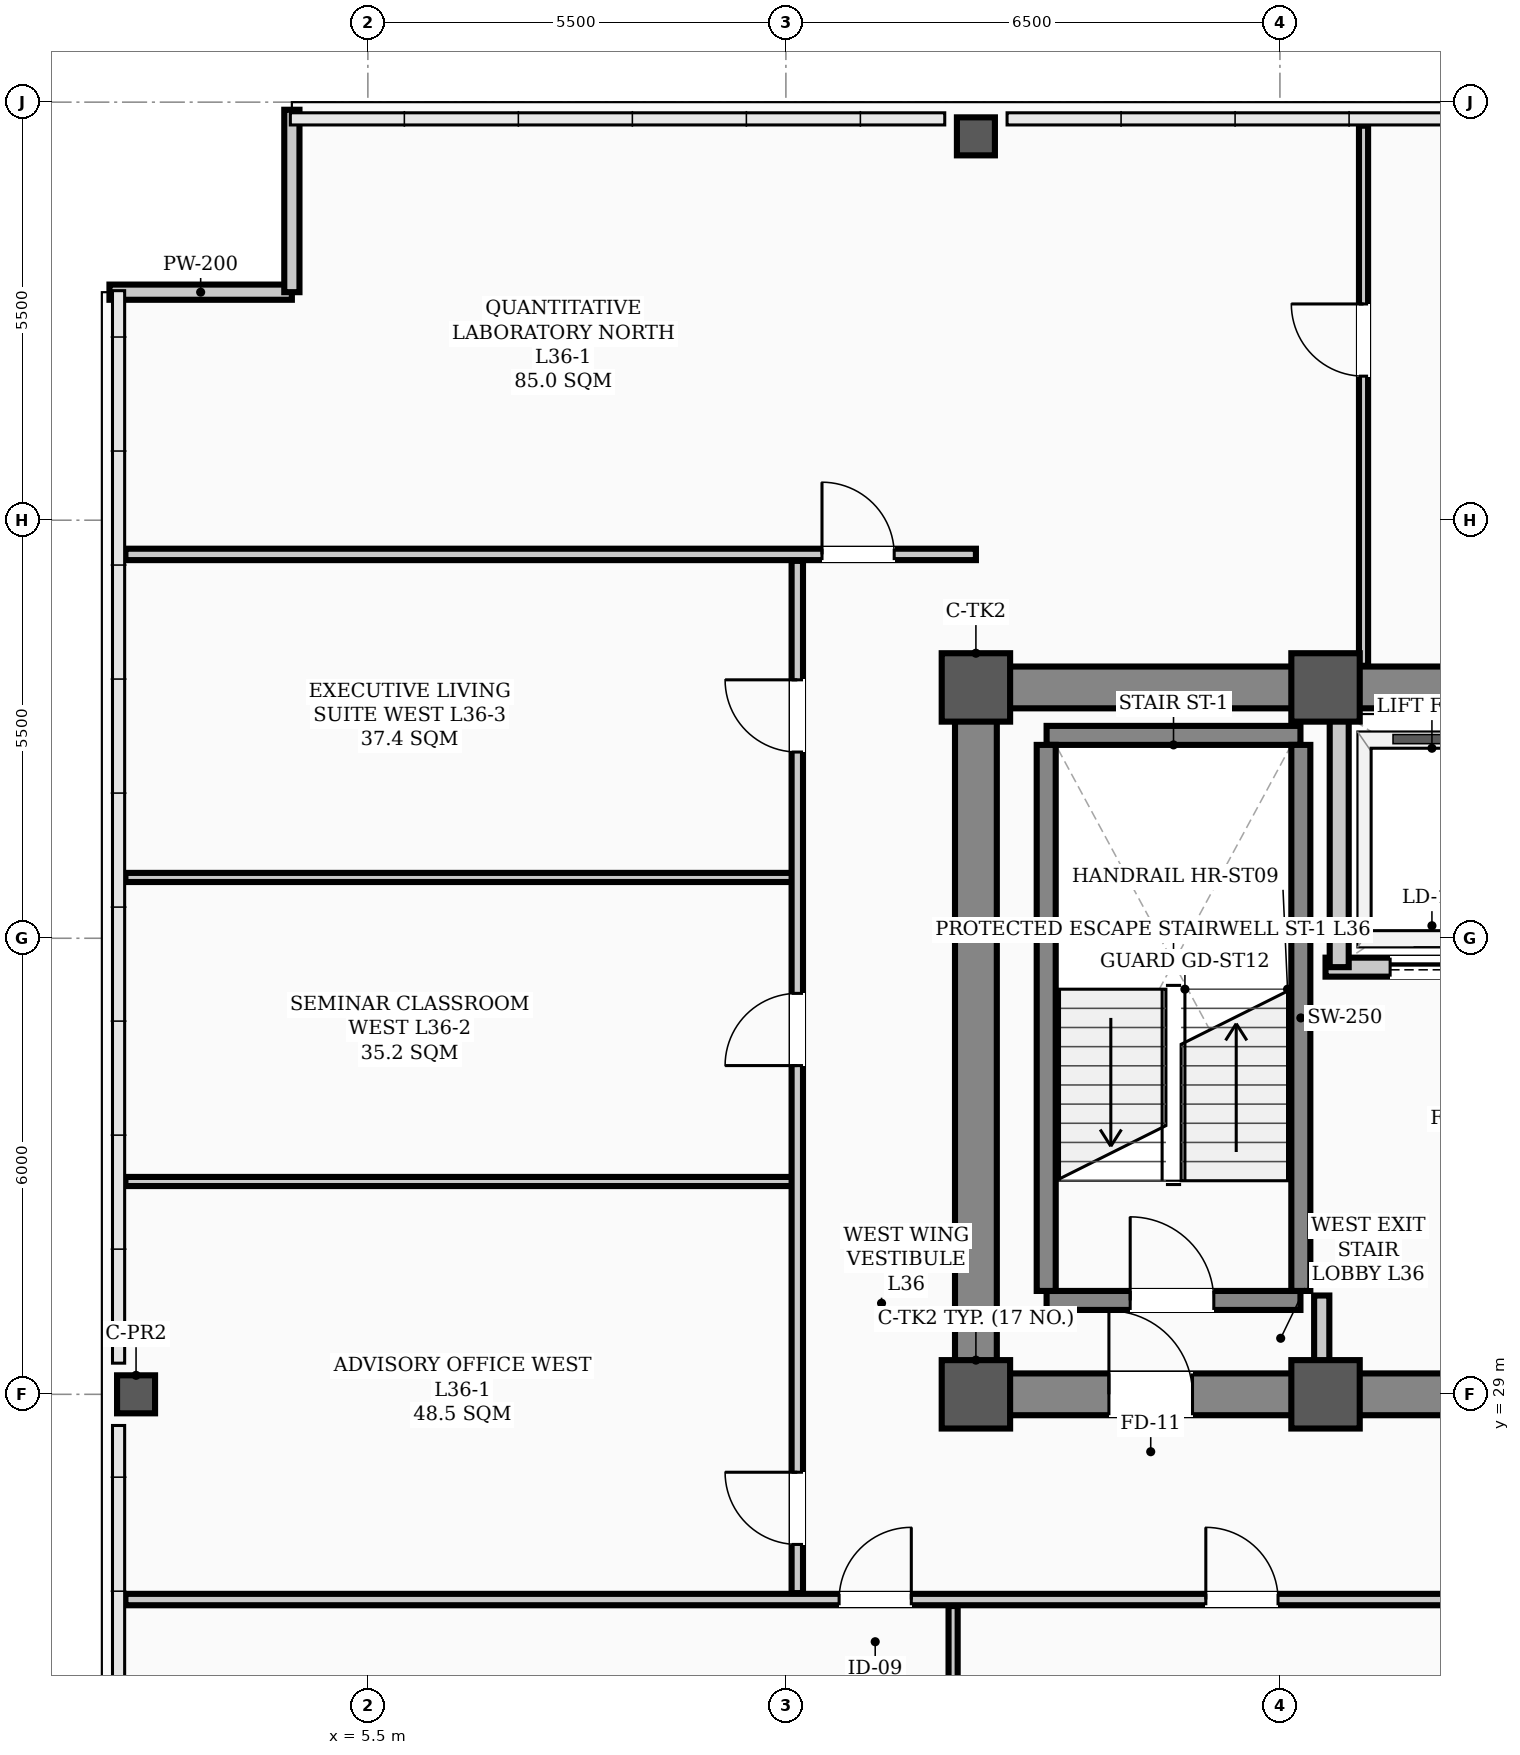
"""IFC4 building model, lengths in metres.
Left out: names, types, materials, properties, quantities, classifications, styles, units other than length and angle.
Written with IfcOpenShell. Run it as: python <this file> out.ifc"""

import sys

from ifc_helpers import new_model, si_unit, direction, frame, frame_2d, origin, origin_2d, place, context, subcontext, project, spatial, rectangle, hollow_rectangle, extrude, element, fill, save


model = new_model("IFC4")
c1 = context("Model", 3, precision=1e-05, world=origin(), true_north=direction((0.0, 1.0)))
c2 = subcontext(c1, "Body", "Model", "MODEL_VIEW")
j1 = project(units=[si_unit("LENGTHUNIT", "METRE"), si_unit("PLANEANGLEUNIT", "RADIAN")], contexts=[c1])
p1 = place(None, origin())
s1 = spatial("IfcSite", under=j1, at=p1, CompositionType="ELEMENT")
p2 = place(p1, origin())
s2 = spatial("IfcBuilding", under=s1, at=p2, CompositionType="ELEMENT")
p3 = place(p2, frame((0.0, 0.0, 146.1)))
s3 = spatial("IfcBuildingStorey", under=s2, at=p3, CompositionType="ELEMENT", Elevation=146.1)
for number, where, z_axis, x_axis in (
    (1, (13.5, 29.0, 0.0), (0.0, 0.0, 1.0), (1.0, 0.0, 0.0)),
    (2, (13.5, 38.3, 0.0), (0.0, 0.0, 1.0), (1.0, 0.0, 0.0)),
    (3, (18.1, 29.0, 0.0), (0.0, 0.0, 1.0), (1.0, 0.0, 0.0)),
    (4, (18.1, 38.3, 0.0), (0.0, 0.0, 1.0), (1.0, 0.0, 0.0)),
):
    element("IfcColumn", number, at=place(p3, frame(where, z_axis=z_axis, x_axis=x_axis)), inside=s3, PredefinedType="COLUMN", context=c2, shape_type="SweptSolid", body=[
        extrude(hollow_rectangle(XDim=0.9, YDim=0.9, WallThickness=0.035, InnerFilletRadius=0.017, OuterFilletRadius=0.052, at=origin_2d()), origin(), (0.0, 0.0, 1.0), 3.9),
    ])
for number, where, z_axis, x_axis in (
    (5, (2.45, 29.0, 0.0), (0.0, 0.0, 1.0), (1.0, 0.0, 0.0)),
    (6, (13.5, 45.55, 0.0), (0.0, 0.0, 1.0), (1.0, 0.0, 0.0)),
):
    element("IfcColumn", number, at=place(p3, frame(where, z_axis=z_axis, x_axis=x_axis)), inside=s3, PredefinedType="COLUMN", context=c2, shape_type="SweptSolid", body=[
        extrude(hollow_rectangle(XDim=0.5, YDim=0.5, WallThickness=0.024, InnerFilletRadius=0.012, OuterFilletRadius=0.036, at=origin_2d()), origin(), (0.0, 0.0, 1.0), 3.9),
    ])
for number, where, z_axis, x_axis in (
    (7, (2.1, 43.5, 0.0), (0.0, 0.0, 1.0), (1.0, 0.0, 0.0)),
    (8, (4.5, 43.5, 0.0), (0.0, 0.0, 1.0), (0.0, 1.0, 0.0)),
):
    element("IfcWall", number, at=place(p3, frame(where, z_axis=z_axis, x_axis=x_axis)), inside=s3, PredefinedType="PARAPET", context=c2, shape_type="SweptSolid", body=[
        extrude(rectangle(XDim=2.4, YDim=0.2, at=frame_2d((1.2, 0.0))), origin(), (0.0, 0.0, 1.0), 1.2),
    ])
p4 = place(p3, frame((13.5, 29.0, 0.0), z_axis=(0.0, 0.0, 1.0), x_axis=(1.0, 0.0, 0.0)))
e9 = element("IfcWall", 9, at=p4, inside=s3, PredefinedType="SHEAR", context=c2, shape_type="SweptSolid", body=[
    extrude(rectangle(XDim=30.5, YDim=0.55, at=frame_2d((15.25, 0.0))), origin(), (0.0, 0.0, 1.0), 3.72),
])
p5 = place(p4, frame((1.75, 0.0, 0.0)))
e10 = element("IfcOpeningElement", 10, at=p5, cuts=e9, PredefinedType="OPENING", context=c2, shape_type="SweptSolid", body=[
    extrude(rectangle(XDim=1.1, YDim=2.08, at=frame_2d((0.55, 1.04))), frame((0.0, 0.285, 0.0), z_axis=(0.0, -1.0, 0.0), x_axis=(1.0, 0.0, 0.0)), (0.0, 0.0, 1.0), 0.57),
])
p6 = place(p4, frame((26.7, 0.0, 0.0)))
e11 = element("IfcOpeningElement", 11, at=p6, cuts=e9, PredefinedType="OPENING", context=c2, shape_type="SweptSolid", body=[
    extrude(rectangle(XDim=1.1, YDim=2.08, at=frame_2d((0.55, 1.04))), frame((0.0, 0.285, 0.0), z_axis=(0.0, -1.0, 0.0), x_axis=(1.0, 0.0, 0.0)), (0.0, 0.0, 1.0), 0.57),
])
p7 = place(p4, frame((6.8, 0.0, 0.0)))
e12 = element("IfcOpeningElement", 12, at=p7, cuts=e9, PredefinedType="OPENING", context=c2, shape_type="SweptSolid", body=[
    extrude(rectangle(XDim=1.1, YDim=2.08, at=frame_2d((0.55, 1.04))), frame((0.0, 0.285, 0.0), z_axis=(0.0, -1.0, 0.0), x_axis=(1.0, 0.0, 0.0)), (0.0, 0.0, 1.0), 0.57),
])
p8 = place(p4, frame((13.2, 0.0, 0.0)))
e13 = element("IfcOpeningElement", 13, at=p8, cuts=e9, PredefinedType="OPENING", context=c2, shape_type="SweptSolid", body=[
    extrude(rectangle(XDim=1.6, YDim=2.08, at=frame_2d((0.8, 1.04))), frame((0.0, 0.285, 0.0), z_axis=(0.0, -1.0, 0.0), x_axis=(1.0, 0.0, 0.0)), (0.0, 0.0, 1.0), 0.57),
])
p9 = place(p4, frame((19.53, 0.0, 0.0)))
e14 = element("IfcOpeningElement", 14, at=p9, cuts=e9, PredefinedType="OPENING", context=c2, shape_type="SweptSolid", body=[
    extrude(rectangle(XDim=0.9, YDim=2.08, at=frame_2d((0.45, 1.04))), frame((0.0, 0.285, 0.0), z_axis=(0.0, -1.0, 0.0), x_axis=(1.0, 0.0, 0.0)), (0.0, 0.0, 1.0), 0.57),
])
p10 = place(p4, frame((21.57, 0.0, 0.0)))
e15 = element("IfcOpeningElement", 15, at=p10, cuts=e9, PredefinedType="OPENING", context=c2, shape_type="SweptSolid", body=[
    extrude(rectangle(XDim=0.9, YDim=2.08, at=frame_2d((0.45, 1.04))), frame((0.0, 0.285, 0.0), z_axis=(0.0, -1.0, 0.0), x_axis=(1.0, 0.0, 0.0)), (0.0, 0.0, 1.0), 0.57),
])
p11 = place(p3, frame((13.5, 38.3, 0.0), z_axis=(0.0, 0.0, 1.0), x_axis=(1.0, 0.0, 0.0)))
e16 = element("IfcWall", 16, at=p11, inside=s3, PredefinedType="SHEAR", context=c2, shape_type="SweptSolid", body=[
    extrude(rectangle(XDim=30.5, YDim=0.55, at=frame_2d((15.25, 0.0))), origin(), (0.0, 0.0, 1.0), 3.72),
])
p12 = place(p3, frame((13.5, 29.35, 0.0), z_axis=(0.0, 0.0, 1.0), x_axis=(0.0, 1.0, 0.0)))
e17 = element("IfcWall", 17, at=p12, inside=s3, PredefinedType="SHEAR", context=c2, shape_type="SweptSolid", body=[
    extrude(rectangle(XDim=8.6, YDim=0.55, at=frame_2d((4.3, 0.0))), origin(), (0.0, 0.0, 1.0), 3.72),
])
p13 = place(p3, frame((14.43, 30.235, 0.0), z_axis=(0.0, 0.0, 1.0), x_axis=(1.0, 0.0, 0.0)))
e18 = element("IfcWall", 18, at=p13, inside=s3, PredefinedType="STANDARD", context=c2, shape_type="SweptSolid", body=[
    extrude(rectangle(XDim=3.34, YDim=0.25, at=frame_2d((1.67, 0.0))), origin(), (0.0, 0.0, 1.0), 3.72),
])
p14 = place(p13, frame((1.1, 0.0, 0.0)))
e19 = element("IfcOpeningElement", 19, at=p14, cuts=e18, PredefinedType="OPENING", context=c2, shape_type="SweptSolid", body=[
    extrude(rectangle(XDim=1.1, YDim=2.08, at=frame_2d((0.55, 1.04))), frame((0.0, 0.135, 0.0), z_axis=(0.0, -1.0, 0.0), x_axis=(1.0, 0.0, 0.0)), (0.0, 0.0, 1.0), 0.27),
])
p15 = place(p3, frame((14.43, 37.669, 0.0), z_axis=(0.0, 0.0, 1.0), x_axis=(1.0, 0.0, 0.0)))
e20 = element("IfcWall", 20, at=p15, inside=s3, PredefinedType="STANDARD", context=c2, shape_type="SweptSolid", body=[
    extrude(rectangle(XDim=3.34, YDim=0.25, at=frame_2d((1.67, 0.0))), origin(), (0.0, 0.0, 1.0), 3.72),
])
for number, where, z_axis, x_axis in (
    (21, (14.425, 30.36, 0.0), (0.0, 0.0, 1.0), (0.0, 1.0, 0.0)),
    (22, (17.775, 30.36, 0.0), (0.0, 0.0, 1.0), (0.0, 1.0, 0.0)),
):
    element("IfcWall", number, at=place(p3, frame(where, z_axis=z_axis, x_axis=x_axis)), inside=s3, PredefinedType="STANDARD", context=c2, shape_type="SweptSolid", body=[
        extrude(rectangle(XDim=7.184, YDim=0.25, at=frame_2d((3.592, 0.0))), origin(), (0.0, 0.0, 1.0), 3.72),
    ])
p16 = place(p3, frame((18.1, 34.62, 0.0), z_axis=(0.0, 0.0, 1.0), x_axis=(1.0, 0.0, 0.0)))
e23 = element("IfcWall", 23, at=p16, inside=s3, PredefinedType="STANDARD", context=c2, shape_type="SweptSolid", body=[
    extrude(rectangle(XDim=5.35, YDim=0.25, at=frame_2d((2.675, 0.0))), origin(), (0.0, 0.0, 1.0), 3.72),
])
p17 = place(p16, frame((0.85, 0.0, 0.0)))
e24 = element("IfcOpeningElement", 24, at=p17, cuts=e23, PredefinedType="OPENING", context=c2, shape_type="SweptSolid", body=[
    extrude(rectangle(XDim=1.1, YDim=2.08, at=frame_2d((0.55, 1.04))), frame((0.0, 0.135, 0.0), z_axis=(0.0, -1.0, 0.0), x_axis=(1.0, 0.0, 0.0)), (0.0, 0.0, 1.0), 0.27),
])
p18 = place(p16, frame((3.45, 0.0, 0.0)))
e25 = element("IfcOpeningElement", 25, at=p18, cuts=e23, PredefinedType="OPENING", context=c2, shape_type="SweptSolid", body=[
    extrude(rectangle(XDim=1.1, YDim=2.08, at=frame_2d((0.55, 1.04))), frame((0.0, 0.135, 0.0), z_axis=(0.0, -1.0, 0.0), x_axis=(1.0, 0.0, 0.0)), (0.0, 0.0, 1.0), 0.27),
])
p19 = place(p3, frame((18.28, 34.62, 0.0), z_axis=(0.0, 0.0, 1.0), x_axis=(0.0, 1.0, 0.0)))
e26 = element("IfcWall", 26, at=p19, inside=s3, PredefinedType="STANDARD", context=c2, shape_type="SweptSolid", body=[
    extrude(rectangle(XDim=3.33, YDim=0.25, at=frame_2d((1.665, 0.0))), origin(), (0.0, 0.0, 1.0), 3.35),
])
p20 = place(p3, frame((2.31, 26.3, 0.0), z_axis=(0.0, 0.0, 1.0), x_axis=(1.0, 0.0, 0.0)))
e27 = element("IfcWall", 27, at=p20, inside=s3, PredefinedType="PARTITIONING", context=c2, shape_type="SweptSolid", body=[
    extrude(rectangle(XDim=46.38, YDim=0.15, at=frame_2d((23.19, 0.0))), origin(), (0.0, 0.0, 1.0), 3.2),
])
p21 = place(p20, frame((9.39, 0.0, 0.0)))
e28 = element("IfcOpeningElement", 28, at=p21, cuts=e27, PredefinedType="OPENING", context=c2, shape_type="SweptSolid", body=[
    extrude(rectangle(XDim=0.95, YDim=2.08, at=frame_2d((0.475, 1.04))), frame((0.0, 0.085, 0.0), z_axis=(0.0, -1.0, 0.0), x_axis=(1.0, 0.0, 0.0)), (0.0, 0.0, 1.0), 0.17),
])
p22 = place(p20, frame((14.215, 0.0, 0.0)))
e29 = element("IfcOpeningElement", 29, at=p22, cuts=e27, PredefinedType="OPENING", context=c2, shape_type="SweptSolid", body=[
    extrude(rectangle(XDim=0.95, YDim=2.08, at=frame_2d((0.475, 1.04))), frame((0.0, 0.085, 0.0), z_axis=(0.0, -1.0, 0.0), x_axis=(1.0, 0.0, 0.0)), (0.0, 0.0, 1.0), 0.17),
])
p23 = place(p20, frame((19.115, 0.0, 0.0)))
e30 = element("IfcOpeningElement", 30, at=p23, cuts=e27, PredefinedType="OPENING", context=c2, shape_type="SweptSolid", body=[
    extrude(rectangle(XDim=0.95, YDim=2.08, at=frame_2d((0.475, 1.04))), frame((0.0, 0.085, 0.0), z_axis=(0.0, -1.0, 0.0), x_axis=(1.0, 0.0, 0.0)), (0.0, 0.0, 1.0), 0.17),
])
p24 = place(p20, frame((23.065, 0.0, 0.0)))
e31 = element("IfcOpeningElement", 31, at=p24, cuts=e27, PredefinedType="OPENING", context=c2, shape_type="SweptSolid", body=[
    extrude(rectangle(XDim=0.95, YDim=2.08, at=frame_2d((0.475, 1.04))), frame((0.0, 0.085, 0.0), z_axis=(0.0, -1.0, 0.0), x_axis=(1.0, 0.0, 0.0)), (0.0, 0.0, 1.0), 0.17),
])
p25 = place(p20, frame((37.715, 0.0, 0.0)))
e32 = element("IfcOpeningElement", 32, at=p25, cuts=e27, PredefinedType="OPENING", context=c2, shape_type="SweptSolid", body=[
    extrude(rectangle(XDim=0.95, YDim=2.08, at=frame_2d((0.475, 1.04))), frame((0.0, 0.085, 0.0), z_axis=(0.0, -1.0, 0.0), x_axis=(1.0, 0.0, 0.0)), (0.0, 0.0, 1.0), 0.17),
])
p26 = place(p20, frame((43.66, 0.0, 0.0)))
e33 = element("IfcOpeningElement", 33, at=p26, cuts=e27, PredefinedType="OPENING", context=c2, shape_type="SweptSolid", body=[
    extrude(rectangle(XDim=0.95, YDim=2.08, at=frame_2d((0.475, 1.04))), frame((0.0, 0.085, 0.0), z_axis=(0.0, -1.0, 0.0), x_axis=(1.0, 0.0, 0.0)), (0.0, 0.0, 1.0), 0.17),
])
for number, where, z_axis, x_axis in (
    (34, (2.31, 31.8, 0.0), (0.0, 0.0, 1.0), (1.0, 0.0, 0.0)),
    (35, (2.31, 35.8, 0.0), (0.0, 0.0, 1.0), (1.0, 0.0, 0.0)),
):
    element("IfcWall", number, at=place(p3, frame(where, z_axis=z_axis, x_axis=x_axis)), inside=s3, PredefinedType="PARTITIONING", context=c2, shape_type="SweptSolid", body=[
        extrude(rectangle(XDim=8.84, YDim=0.12, at=frame_2d((4.42, 0.0))), origin(), (0.0, 0.0, 1.0), 3.72),
    ])
p27 = place(p3, frame((2.31, 40.05, 0.0), z_axis=(0.0, 0.0, 1.0), x_axis=(1.0, 0.0, 0.0)))
e36 = element("IfcWall", 36, at=p27, inside=s3, PredefinedType="PARTITIONING", context=c2, shape_type="SweptSolid", body=[
    extrude(rectangle(XDim=11.19, YDim=0.15, at=frame_2d((5.595, 0.0))), origin(), (0.0, 0.0, 1.0), 3.2),
])
p28 = place(p27, frame((9.165, 0.0, 0.0)))
e37 = element("IfcOpeningElement", 37, at=p28, cuts=e36, PredefinedType="OPENING", context=c2, shape_type="SweptSolid", body=[
    extrude(rectangle(XDim=0.95, YDim=2.08, at=frame_2d((0.475, 1.04))), frame((0.0, 0.085, 0.0), z_axis=(0.0, -1.0, 0.0), x_axis=(1.0, 0.0, 0.0)), (0.0, 0.0, 1.0), 0.17),
])
p29 = place(p3, frame((18.05, 29.285, 0.0), z_axis=(0.0, 0.0, 1.0), x_axis=(0.0, 1.0, 0.0)))
e38 = element("IfcWall", 38, at=p29, inside=s3, PredefinedType="STANDARD", context=c2, shape_type="SweptSolid", body=[
    extrude(rectangle(XDim=1.015, YDim=0.2, at=frame_2d((0.508, 0.0))), origin(), (0.0, 0.0, 1.0), 3.35),
])
p30 = place(p3, frame((11.15, 26.385, 0.0), z_axis=(0.0, 0.0, 1.0), x_axis=(0.0, 1.0, 0.0)))
e39 = element("IfcWall", 39, at=p30, inside=s3, PredefinedType="PARTITIONING", context=c2, shape_type="SweptSolid", body=[
    extrude(rectangle(XDim=13.58, YDim=0.15, at=frame_2d((6.79, 0.0))), origin(), (0.0, 0.0, 1.0), 3.1),
])
p31 = place(p30, frame((0.64, 0.0, 0.0)))
e40 = element("IfcOpeningElement", 40, at=p31, cuts=e39, PredefinedType="OPENING", context=c2, shape_type="SweptSolid", body=[
    extrude(rectangle(XDim=0.95, YDim=2.08, at=frame_2d((0.475, 1.04))), frame((0.0, 0.085, 0.0), z_axis=(0.0, -1.0, 0.0), x_axis=(1.0, 0.0, 0.0)), (0.0, 0.0, 1.0), 0.17),
])
p32 = place(p30, frame((6.94, 0.0, 0.0)))
e41 = element("IfcOpeningElement", 41, at=p32, cuts=e39, PredefinedType="OPENING", context=c2, shape_type="SweptSolid", body=[
    extrude(rectangle(XDim=0.95, YDim=2.08, at=frame_2d((0.475, 1.04))), frame((0.0, 0.085, 0.0), z_axis=(0.0, -1.0, 0.0), x_axis=(1.0, 0.0, 0.0)), (0.0, 0.0, 1.0), 0.17),
])
p33 = place(p30, frame((11.065, 0.0, 0.0)))
e42 = element("IfcOpeningElement", 42, at=p33, cuts=e39, PredefinedType="OPENING", context=c2, shape_type="SweptSolid", body=[
    extrude(rectangle(XDim=0.95, YDim=2.08, at=frame_2d((0.475, 1.04))), frame((0.0, 0.085, 0.0), z_axis=(0.0, -1.0, 0.0), x_axis=(1.0, 0.0, 0.0)), (0.0, 0.0, 1.0), 0.17),
])
p34 = place(p3, frame((13.2, 16.31, 0.0), z_axis=(0.0, 0.0, 1.0), x_axis=(0.0, 1.0, 0.0)))
e43 = element("IfcWall", 43, at=p34, inside=s3, PredefinedType="PARTITIONING", context=c2, shape_type="SweptSolid", body=[
    extrude(rectangle(XDim=9.905, YDim=0.12, at=frame_2d((4.953, 0.0))), origin(), (0.0, 0.0, 1.0), 3.1),
])
p35 = place(p3, frame((18.6, 38.585, 0.0), z_axis=(0.0, 0.0, 1.0), x_axis=(0.0, 1.0, 0.0)))
e44 = element("IfcWall", 44, at=p35, inside=s3, PredefinedType="PARTITIONING", context=c2, shape_type="SweptSolid", body=[
    extrude(rectangle(XDim=7.105, YDim=0.12, at=frame_2d((3.552, 0.0))), origin(), (0.0, 0.0, 1.0), 3.212),
])
p36 = place(p35, frame((3.81, 0.0, 0.0)))
e45 = element("IfcOpeningElement", 45, at=p36, cuts=e44, PredefinedType="OPENING", context=c2, shape_type="SweptSolid", body=[
    extrude(rectangle(XDim=0.95, YDim=2.08, at=frame_2d((0.475, 1.04))), frame((0.0, 0.07, 0.0), z_axis=(0.0, -1.0, 0.0), x_axis=(1.0, 0.0, 0.0)), (0.0, 0.0, 1.0), 0.14),
])
p37 = place(p14, origin())
e46 = element("IfcDoor", 46, at=p37, inside=s3, OperationType="SINGLE_SWING_LEFT", PredefinedType="DOOR", context=c2, shape_type="SweptSolid", body=[
    extrude(rectangle(XDim=1.1, YDim=2.08, at=frame_2d((0.55, 1.04))), frame((0.0, 0.025, 0.0), z_axis=(0.0, -1.0, 0.0), x_axis=(1.0, 0.0, 0.0)), (0.0, 0.0, 1.0), 0.05),
])
fill(e19, e46)
p38 = place(p5, origin())
e47 = element("IfcDoor", 47, at=p38, inside=s3, OperationType="SINGLE_SWING_LEFT", PredefinedType="DOOR", context=c2, shape_type="SweptSolid", body=[
    extrude(rectangle(XDim=1.1, YDim=2.08, at=frame_2d((0.55, 1.04))), frame((0.0, 0.025, 0.0), z_axis=(0.0, -1.0, 0.0), x_axis=(1.0, 0.0, 0.0)), (0.0, 0.0, 1.0), 0.05),
])
fill(e10, e47)
p39 = place(p21, origin())
e48 = element("IfcDoor", 48, at=p39, inside=s3, OperationType="SINGLE_SWING_RIGHT", PredefinedType="DOOR", context=c2, shape_type="SweptSolid", body=[
    extrude(rectangle(XDim=0.95, YDim=2.08, at=frame_2d((0.475, 1.04))), frame((0.0, 0.025, 0.0), z_axis=(0.0, -1.0, 0.0), x_axis=(1.0, 0.0, 0.0)), (0.0, 0.0, 1.0), 0.05),
])
fill(e28, e48)
p40 = place(p22, origin())
e49 = element("IfcDoor", 49, at=p40, inside=s3, OperationType="SINGLE_SWING_LEFT", PredefinedType="DOOR", context=c2, shape_type="SweptSolid", body=[
    extrude(rectangle(XDim=0.95, YDim=2.08, at=frame_2d((0.475, 1.04))), frame((0.0, 0.025, 0.0), z_axis=(0.0, -1.0, 0.0), x_axis=(1.0, 0.0, 0.0)), (0.0, 0.0, 1.0), 0.05),
])
fill(e29, e49)
p41 = place(p31, origin())
e50 = element("IfcDoor", 50, at=p41, inside=s3, OperationType="SINGLE_SWING_RIGHT", PredefinedType="DOOR", context=c2, shape_type="SweptSolid", body=[
    extrude(rectangle(XDim=0.95, YDim=2.08, at=frame_2d((0.475, 1.04))), frame((0.0, 0.025, 0.0), z_axis=(0.0, -1.0, 0.0), x_axis=(1.0, 0.0, 0.0)), (0.0, 0.0, 1.0), 0.05),
])
fill(e40, e50)
p42 = place(p32, origin())
e51 = element("IfcDoor", 51, at=p42, inside=s3, OperationType="SINGLE_SWING_LEFT", PredefinedType="DOOR", context=c2, shape_type="SweptSolid", body=[
    extrude(rectangle(XDim=0.95, YDim=2.08, at=frame_2d((0.475, 1.04))), frame((0.0, 0.025, 0.0), z_axis=(0.0, -1.0, 0.0), x_axis=(1.0, 0.0, 0.0)), (0.0, 0.0, 1.0), 0.05),
])
fill(e41, e51)
p43 = place(p33, origin())
e52 = element("IfcDoor", 52, at=p43, inside=s3, OperationType="SINGLE_SWING_RIGHT", PredefinedType="DOOR", context=c2, shape_type="SweptSolid", body=[
    extrude(rectangle(XDim=0.95, YDim=2.08, at=frame_2d((0.475, 1.04))), frame((0.0, 0.025, 0.0), z_axis=(0.0, -1.0, 0.0), x_axis=(1.0, 0.0, 0.0)), (0.0, 0.0, 1.0), 0.05),
])
fill(e42, e52)
p44 = place(p28, origin())
e53 = element("IfcDoor", 53, at=p44, inside=s3, OperationType="SINGLE_SWING_LEFT", PredefinedType="DOOR", context=c2, shape_type="SweptSolid", body=[
    extrude(rectangle(XDim=0.95, YDim=2.08, at=frame_2d((0.475, 1.04))), frame((0.0, 0.025, 0.0), z_axis=(0.0, -1.0, 0.0), x_axis=(1.0, 0.0, 0.0)), (0.0, 0.0, 1.0), 0.05),
])
fill(e37, e53)
p45 = place(p36, origin())
e54 = element("IfcDoor", 54, at=p45, inside=s3, OperationType="SINGLE_SWING_RIGHT", PredefinedType="DOOR", context=c2, shape_type="SweptSolid", body=[
    extrude(rectangle(XDim=0.95, YDim=2.08, at=frame_2d((0.475, 1.04))), frame((0.0, 0.025, 0.0), z_axis=(0.0, -1.0, 0.0), x_axis=(1.0, 0.0, 0.0)), (0.0, 0.0, 1.0), 0.05),
])
fill(e45, e54)
p46 = place(p17, origin())
e55 = element("IfcDoor", 55, at=p46, inside=s3, OperationType="SLIDING_TO_LEFT", PredefinedType="DOOR", context=c2, shape_type="SweptSolid", body=[
    extrude(rectangle(XDim=1.1, YDim=2.08, at=frame_2d((0.55, 1.04))), frame((0.0, 0.025, 0.0), z_axis=(0.0, -1.0, 0.0), x_axis=(1.0, 0.0, 0.0)), (0.0, 0.0, 1.0), 0.05),
])
fill(e24, e55)
save(model, sys.argv[1])
